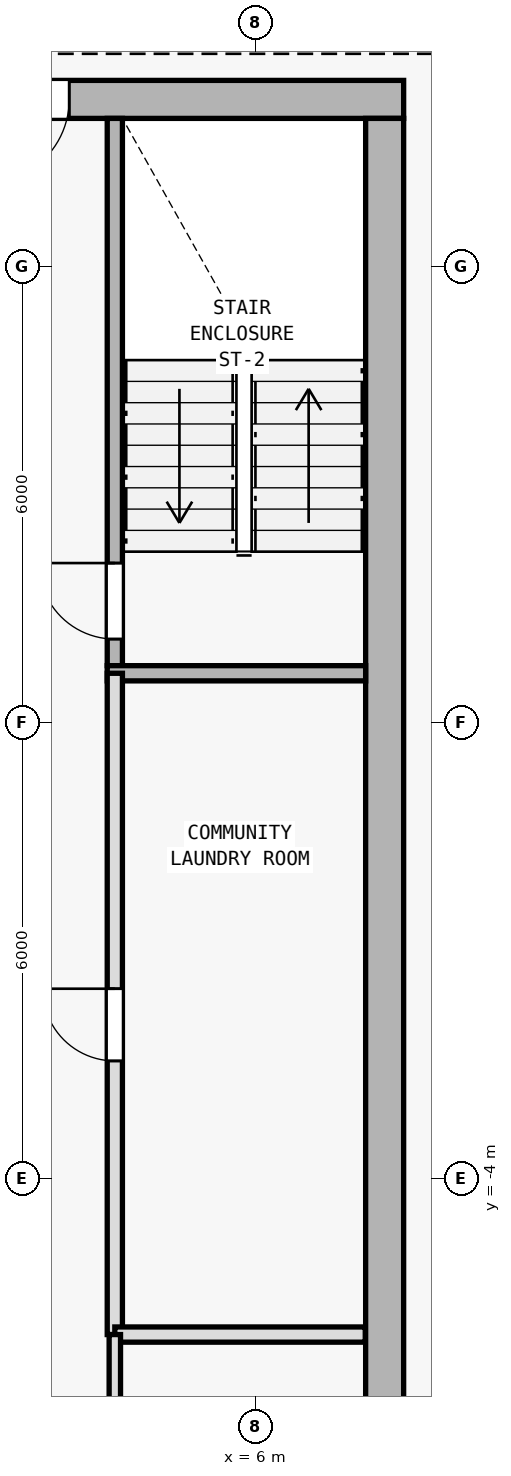
"""IFC4 building model, lengths in metres.
Left out: names, types, materials, properties, quantities, classifications, styles, units other than length and angle.
Written with IfcOpenShell. Run it as: python <this file> out.ifc"""

import sys

from ifc_helpers import new_model, si_unit, direction, frame, frame_2d, origin, origin_2d, place, context, subcontext, project, spatial, rectangle, i_section, extrude, element, fill, save


model = new_model("IFC4")
c1 = context("Model", 3, precision=1e-05, world=origin(), true_north=direction((0.0, 1.0)))
c2 = subcontext(c1, "Body", "Model", "MODEL_VIEW")
j1 = project(units=[si_unit("LENGTHUNIT", "METRE"), si_unit("PLANEANGLEUNIT", "RADIAN")], contexts=[c1])
p1 = place(None, origin())
s1 = spatial("IfcSite", under=j1, at=p1, CompositionType="ELEMENT")
p2 = place(p1, origin())
s2 = spatial("IfcBuilding", under=s1, at=p2, CompositionType="ELEMENT")
p3 = place(p2, frame((0.0, 0.0, 201.9)))
s3 = spatial("IfcBuildingStorey", under=s2, at=p3, CompositionType="ELEMENT", Elevation=201.9)
for number, where, z_axis, x_axis in (
    (1, (7.7, 10.2, 0.0), (0.0, 0.0, 1.0), (1.0, 0.0, 0.0)),
    (2, (7.7, 0.4, 0.0), (0.0, 0.0, 1.0), (1.0, 0.0, 0.0)),
):
    element("IfcColumn", number, at=place(p3, frame(where, z_axis=z_axis, x_axis=x_axis)), inside=s3, PredefinedType="COLUMN", context=c2, shape_type="SweptSolid", body=[
        extrude(i_section(OverallWidth=0.398, OverallDepth=0.387, WebThickness=0.013, FlangeThickness=0.022, FilletRadius=0.015, at=origin_2d()), origin(), (0.0, 0.0, 1.0), 3.6),
    ])
p4 = place(p3, frame((7.95, 10.2, 0.0), z_axis=(0.0, 0.0, 1.0), x_axis=(-1.0, 0.0, 0.0)))
e3 = element("IfcWall", 3, at=p4, inside=s3, PredefinedType="SHEAR", context=c2, shape_type="SweptSolid", body=[
    extrude(rectangle(XDim=15.9, YDim=0.5, at=frame_2d((7.95, 0.0))), origin(), (0.0, 0.0, 1.0), 3.35),
])
p5 = place(p4, frame((4.4, 0.0, 0.0)))
e4 = element("IfcOpeningElement", 4, at=p5, cuts=e3, PredefinedType="OPENING", context=c2, shape_type="SweptSolid", body=[
    extrude(rectangle(XDim=1.1, YDim=2.15, at=frame_2d((0.55, 1.075))), frame((0.0, 0.26, 0.0), z_axis=(0.0, -1.0, 0.0), x_axis=(1.0, 0.0, 0.0)), (0.0, 0.0, 1.0), 0.52),
])
p6 = place(p3, frame((7.7, 9.95, 0.0), z_axis=(0.0, 0.0, 1.0), x_axis=(0.0, -1.0, 0.0)))
e5 = element("IfcWall", 5, at=p6, inside=s3, PredefinedType="SHEAR", context=c2, shape_type="SweptSolid", body=[
    extrude(rectangle(XDim=19.1, YDim=0.5, at=frame_2d((9.55, 0.0))), origin(), (0.0, 0.0, 1.0), 3.35),
])
p7 = place(p3, frame((4.15, 2.75, 0.0), z_axis=(0.0, 0.0, 1.0), x_axis=(0.0, 1.0, 0.0)))
e6 = element("IfcWall", 6, at=p7, inside=s3, PredefinedType="SOLIDWALL", context=c2, shape_type="SweptSolid", body=[
    extrude(rectangle(XDim=7.2, YDim=0.2, at=frame_2d((3.6, 0.0))), origin(), (0.0, 0.0, 1.0), 3.35),
])
p8 = place(p7, frame((0.35, 0.0, 0.0)))
e7 = element("IfcOpeningElement", 7, at=p8, cuts=e6, PredefinedType="OPENING", context=c2, shape_type="SweptSolid", body=[
    extrude(rectangle(XDim=1.0, YDim=2.15, at=frame_2d((0.5, 1.075))), frame((0.0, 0.11, 0.0), z_axis=(0.0, -1.0, 0.0), x_axis=(1.0, 0.0, 0.0)), (0.0, 0.0, 1.0), 0.22),
])
p9 = place(p3, frame((4.05, 2.65, 0.0), z_axis=(0.0, 0.0, 1.0), x_axis=(1.0, 0.0, 0.0)))
e8 = element("IfcWall", 8, at=p9, inside=s3, PredefinedType="SOLIDWALL", context=c2, shape_type="SweptSolid", body=[
    extrude(rectangle(XDim=3.4, YDim=0.2, at=frame_2d((1.7, 0.0))), origin(), (0.0, 0.0, 1.0), 3.35),
])
p10 = place(p3, frame((4.15, -6.05, 0.0), z_axis=(0.0, 0.0, 1.0), x_axis=(0.0, 1.0, 0.0)))
e9 = element("IfcWall", 9, at=p10, inside=s3, PredefinedType="SOLIDWALL", context=c2, shape_type="SweptSolid", body=[
    extrude(rectangle(XDim=8.7, YDim=0.2, at=frame_2d((4.35, 0.0))), origin(), (0.0, 0.0, 1.0), 3.35),
])
p11 = place(p10, frame((3.6, 0.0, 0.0)))
e10 = element("IfcOpeningElement", 10, at=p11, cuts=e9, PredefinedType="OPENING", context=c2, shape_type="SweptSolid", body=[
    extrude(rectangle(XDim=0.95, YDim=2.1, at=frame_2d((0.475, 1.05))), frame((0.0, 0.11, 0.0), z_axis=(0.0, -1.0, 0.0), x_axis=(1.0, 0.0, 0.0)), (0.0, 0.0, 1.0), 0.22),
])
p12 = place(p3, frame((4.15, -6.05, 0.0), z_axis=(0.0, 0.0, 1.0), x_axis=(1.0, 0.0, 0.0)))
e11 = element("IfcWall", 11, at=p12, inside=s3, PredefinedType="SOLIDWALL", context=c2, shape_type="SweptSolid", body=[
    extrude(rectangle(XDim=3.295, YDim=0.2, at=frame_2d((1.647, 0.0))), origin(), (0.0, 0.0, 1.0), 3.35),
])
p13 = place(p3, frame((4.15, -9.145, 0.0), z_axis=(0.0, 0.0, 1.0), x_axis=(0.0, 1.0, 0.0)))
e12 = element("IfcWall", 12, at=p13, inside=s3, PredefinedType="PARTITIONING", context=c2, shape_type="SweptSolid", body=[
    extrude(rectangle(XDim=3.095, YDim=0.15, at=frame_2d((1.547, 0.0))), origin(), (0.0, 0.0, 1.0), 3.35),
])
p14 = place(p13, frame((0.845, 0.0, 0.0)))
e13 = element("IfcOpeningElement", 13, at=p14, cuts=e12, PredefinedType="OPENING", context=c2, shape_type="SweptSolid", body=[
    extrude(rectangle(XDim=0.9, YDim=2.1, at=frame_2d((0.45, 1.05))), frame((0.0, 0.085, 0.0), z_axis=(0.0, -1.0, 0.0), x_axis=(1.0, 0.0, 0.0)), (0.0, 0.0, 1.0), 0.17),
])
p15 = place(p3, frame((7.023, 12.36, 0.0), z_axis=(0.0, 0.0, 1.0), x_axis=(0.84376480085, -0.536713108511, 0.0)))
e14 = element("IfcWall", 14, at=p15, inside=s3, PredefinedType="PARTITIONING", context=c2, shape_type="SweptSolid", body=[
    extrude(rectangle(XDim=7.297, YDim=0.15, at=frame_2d((3.648, 0.0))), origin(), (0.0, 0.0, 1.0), 2.935),
])
p16 = place(p5, origin())
e15 = element("IfcDoor", 15, at=p16, inside=s3, OperationType="SINGLE_SWING_RIGHT", PredefinedType="DOOR", context=c2, shape_type="SweptSolid", body=[
    extrude(rectangle(XDim=1.1, YDim=2.15, at=frame_2d((0.55, 1.075))), frame((0.0, 0.025, 0.0), z_axis=(0.0, -1.0, 0.0), x_axis=(1.0, 0.0, 0.0)), (0.0, 0.0, 1.0), 0.05),
])
fill(e4, e15)
p17 = place(p8, origin())
e16 = element("IfcDoor", 16, at=p17, inside=s3, OperationType="SINGLE_SWING_RIGHT", PredefinedType="DOOR", context=c2, shape_type="SweptSolid", body=[
    extrude(rectangle(XDim=1.0, YDim=2.15, at=frame_2d((0.5, 1.075))), frame((0.0, 0.025, 0.0), z_axis=(0.0, -1.0, 0.0), x_axis=(1.0, 0.0, 0.0)), (0.0, 0.0, 1.0), 0.05),
])
fill(e7, e16)
p18 = place(p11, origin())
e17 = element("IfcDoor", 17, at=p18, inside=s3, OperationType="SINGLE_SWING_RIGHT", PredefinedType="DOOR", context=c2, shape_type="SweptSolid", body=[
    extrude(rectangle(XDim=0.95, YDim=2.1, at=frame_2d((0.475, 1.05))), frame((0.0, 0.025, 0.0), z_axis=(0.0, -1.0, 0.0), x_axis=(1.0, 0.0, 0.0)), (0.0, 0.0, 1.0), 0.05),
])
fill(e10, e17)
save(model, sys.argv[1])
